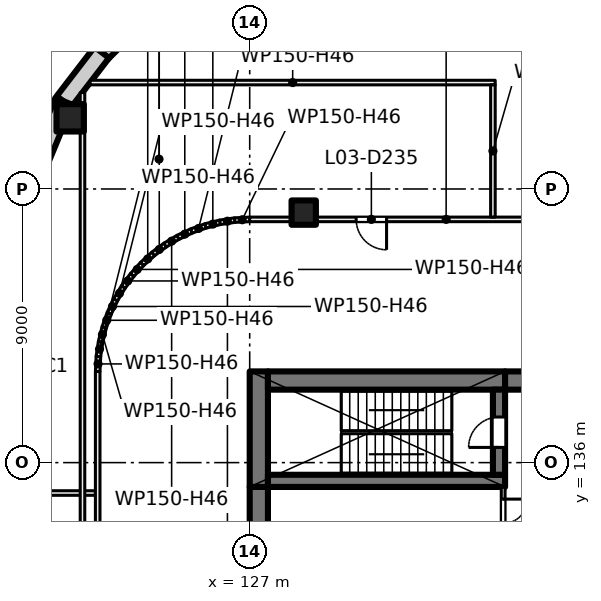
"""IFC4 building model, lengths in metres.
Left out: names, types, materials, properties, quantities, classifications, styles, units other than length and angle.
Written with IfcOpenShell. Run it as: python <this file> out.ifc"""

import sys

from ifc_helpers import new_model, si_unit, direction, frame, frame_2d, origin, origin_2d, place, context, subcontext, project, spatial, rectangle, extrude, element, fill, save


model = new_model("IFC4")
c1 = context("Model", 3, precision=1e-05, world=origin(), true_north=direction((0.0, 1.0)))
c2 = subcontext(c1, "Body", "Model", "MODEL_VIEW")
j1 = project(units=[si_unit("LENGTHUNIT", "METRE"), si_unit("PLANEANGLEUNIT", "RADIAN")], contexts=[c1])
p1 = place(None, origin())
s1 = spatial("IfcSite", under=j1, at=p1, CompositionType="ELEMENT")
p2 = place(p1, origin())
s2 = spatial("IfcBuilding", under=s1, at=p2, CompositionType="ELEMENT")
p3 = place(p2, frame((0.0, 0.0, 17.5)))
s3 = spatial("IfcBuildingStorey", under=s2, at=p3, CompositionType="ELEMENT", Elevation=17.5)
p4 = place(p3, frame((121.095, 147.341, 0.0), z_axis=(0.0, 0.0, 1.0), x_axis=(1.0, 0.0, 0.0)))
e1 = element("IfcColumn", 1, at=p4, inside=s3, PredefinedType="COLUMN", context=c2, shape_type="SweptSolid", body=[
    extrude(rectangle(XDim=0.9, YDim=0.9, at=origin_2d()), origin(), (0.0, 0.0, 1.0), 5.0),
])
p5 = place(p3, frame((128.777, 144.223, 0.0), z_axis=(0.0, 0.0, 1.0), x_axis=(1.0, 0.0, 0.0)))
e2 = element("IfcColumn", 2, at=p5, inside=s3, PredefinedType="COLUMN", context=c2, shape_type="SweptSolid", body=[
    extrude(rectangle(XDim=0.8, YDim=0.8, at=origin_2d()), origin(), (0.0, 0.0, 1.0), 5.0),
])
p6 = place(p3, frame((127.3, 120.8, 0.0), z_axis=(0.0, 0.0, 1.0), x_axis=(0.0, 1.0, 0.0)))
e3 = element("IfcWall", 3, at=p6, inside=s3, PredefinedType="SHEAR", context=c2, shape_type="SweptSolid", body=[
    extrude(rectangle(XDim=14.4, YDim=0.6, at=frame_2d((7.2, 0.0))), origin(), (0.0, 0.0, 1.0), 5.0),
])
p7 = place(p3, frame((127.3, 135.2, 0.0), z_axis=(0.0, 0.0, 1.0), x_axis=(0.0, 1.0, 0.0)))
e4 = element("IfcWall", 4, at=p7, inside=s3, PredefinedType="SHEAR", context=c2, shape_type="SweptSolid", body=[
    extrude(rectangle(XDim=3.8, YDim=0.6, at=frame_2d((1.9, 0.0))), origin(), (0.0, 0.0, 1.0), 5.0),
])
p8 = place(p3, frame((127.6, 138.7, 0.0), z_axis=(0.0, 0.0, 1.0), x_axis=(1.0, 0.0, 0.0)))
e5 = element("IfcWall", 5, at=p8, inside=s3, PredefinedType="SHEAR", context=c2, shape_type="SweptSolid", body=[
    extrude(rectangle(XDim=7.8, YDim=0.6, at=frame_2d((3.9, 0.0))), origin(), (0.0, 0.0, 1.0), 5.0),
])
p9 = place(p3, frame((135.4, 138.7, 0.0), z_axis=(0.0, 0.0, 1.0), x_axis=(1.0, 0.0, 0.0)))
e6 = element("IfcWall", 6, at=p9, inside=s3, PredefinedType="SHEAR", context=c2, shape_type="SweptSolid", body=[
    extrude(rectangle(XDim=4.6, YDim=0.6, at=frame_2d((2.3, 0.0))), origin(), (0.0, 0.0, 1.0), 5.0),
])
p10 = place(p3, frame((127.6, 135.4, 0.0), z_axis=(0.0, 0.0, 1.0), x_axis=(1.0, 0.0, 0.0)))
e7 = element("IfcWall", 7, at=p10, inside=s3, PredefinedType="SHEAR", context=c2, shape_type="SweptSolid", body=[
    extrude(rectangle(XDim=7.8, YDim=0.4, at=frame_2d((3.9, 0.0))), origin(), (0.0, 0.0, 1.0), 5.0),
])
p11 = place(p3, frame((135.2, 135.6, 0.0), z_axis=(0.0, 0.0, 1.0), x_axis=(0.0, 1.0, 0.0)))
e8 = element("IfcWall", 8, at=p11, inside=s3, PredefinedType="SHEAR", context=c2, shape_type="SweptSolid", body=[
    extrude(rectangle(XDim=2.8, YDim=0.4, at=frame_2d((1.4, 0.0))), origin(), (0.0, 0.0, 1.0), 5.0),
])
p12 = place(p11, frame((0.9, 0.0, 0.0)))
e9 = element("IfcOpeningElement", 9, at=p12, cuts=e8, PredefinedType="OPENING", context=c2, shape_type="SweptSolid", body=[
    extrude(rectangle(XDim=1.0, YDim=2.1, at=frame_2d((0.5, 1.05))), frame((0.0, 0.21, 0.0), z_axis=(0.0, -1.0, 0.0), x_axis=(1.0, 0.0, 0.0)), (0.0, 0.0, 1.0), 0.42),
])
p13 = place(p3, frame((122.11, 149.463, 0.0), z_axis=(0.0, 0.0, 1.0), x_axis=(0.707106781187, 0.707106781187, 0.0)))
e10 = element("IfcWall", 10, at=p13, inside=s3, PredefinedType="SOLIDWALL", context=c2, shape_type="SweptSolid", body=[
    extrude(rectangle(XDim=2.018, YDim=0.6, at=frame_2d((1.009, 0.0))), origin(), (0.0, 0.0, 1.0), 4.6),
])
p14 = place(p3, frame((120.891, 147.872, 0.0), z_axis=(0.0, 0.0, 1.0), x_axis=(0.609058260448, 0.793125485267, 0.0)))
e11 = element("IfcWall", 11, at=p14, inside=s3, PredefinedType="SOLIDWALL", context=c2, shape_type="SweptSolid", body=[
    extrude(rectangle(XDim=2.044, YDim=0.6, at=frame_2d((1.022, 0.0))), origin(), (0.0, 0.0, 1.0), 4.6),
])
p15 = place(p3, frame((120.079, 145.931, 0.0), z_axis=(0.0, 0.0, 1.0), x_axis=(0.382375593358, 0.924006983526, 0.0)))
e12 = element("IfcWall", 12, at=p15, inside=s3, PredefinedType="SOLIDWALL", context=c2, shape_type="SweptSolid", body=[
    extrude(rectangle(XDim=2.114, YDim=0.6, at=frame_2d((1.057, 0.0))), origin(), (0.0, 0.0, 1.0), 4.6),
])
p16 = place(p3, frame((135.337, 135.2, 0.0), z_axis=(0.0, 0.0, 1.0), x_axis=(0.0, -1.0, 0.0)))
e13 = element("IfcWall", 13, at=p16, inside=s3, PredefinedType="PARTITIONING", context=c2, shape_type="SweptSolid", body=[
    extrude(rectangle(XDim=1.6, YDim=0.125, at=frame_2d((0.8, 0.0))), origin(), (0.0, 0.0, 1.0), 4.6),
])
p17 = place(p16, frame((0.4, 0.0, 0.0)))
e14 = element("IfcOpeningElement", 14, at=p17, cuts=e13, PredefinedType="OPENING", context=c2, shape_type="SweptSolid", body=[
    extrude(rectangle(XDim=0.8, YDim=2.1, at=frame_2d((0.4, 1.05))), frame((0.0, 0.073, 0.0), z_axis=(0.0, -1.0, 0.0), x_axis=(1.0, 0.0, 0.0)), (0.0, 0.0, 1.0), 0.145),
])
p18 = place(p3, frame((113.075, 135.0, 0.0), z_axis=(0.0, 0.0, 1.0), x_axis=(1.0, 0.0, 0.0)))
e15 = element("IfcWall", 15, at=p18, inside=s3, PredefinedType="PARTITIONING", context=c2, shape_type="SweptSolid", body=[
    extrude(rectangle(XDim=8.85, YDim=0.15, at=frame_2d((4.425, 0.0))), origin(), (0.0, 0.0, 1.0), 4.6),
])
p19 = place(p3, frame((121.5, 107.925, 0.0), z_axis=(0.0, 0.0, 1.0), x_axis=(0.0, 1.0, 0.0)))
e16 = element("IfcWall", 16, at=p19, inside=s3, PredefinedType="PARTITIONING", context=c2, shape_type="SweptSolid", body=[
    extrude(rectangle(XDim=40.247, YDim=0.15, at=frame_2d((20.124, 0.0))), origin(), (0.0, 0.0, 1.0), 4.6),
])
p20 = place(p3, frame((121.752, 148.5, 0.0), z_axis=(0.0, 0.0, 1.0), x_axis=(1.0, 0.0, 0.0)))
e17 = element("IfcWall", 17, at=p20, inside=s3, PredefinedType="PARTITIONING", context=c2, shape_type="SweptSolid", body=[
    extrude(rectangle(XDim=13.323, YDim=0.15, at=frame_2d((6.662, 0.0))), origin(), (0.0, 0.0, 1.0), 4.6),
])
p21 = place(p3, frame((122.0, 139.002, 0.0), z_axis=(0.0, 0.0, 1.0), x_axis=(0.0, -1.0, 0.0)))
e18 = element("IfcWall", 18, at=p21, inside=s3, PredefinedType="PARTITIONING", context=c2, shape_type="SweptSolid", body=[
    extrude(rectangle(XDim=22.004, YDim=0.15, at=frame_2d((11.002, 0.0))), origin(), (0.0, 0.0, 1.0), 4.6),
])
p22 = place(p21, frame((10.252, 0.0, 0.0)))
e19 = element("IfcOpeningElement", 19, at=p22, cuts=e18, PredefinedType="OPENING", context=c2, shape_type="SweptSolid", body=[
    extrude(rectangle(XDim=1.0, YDim=2.1, at=frame_2d((0.5, 1.05))), frame((0.0, 0.085, 0.0), z_axis=(0.0, -1.0, 0.0), x_axis=(1.0, 0.0, 0.0)), (0.0, 0.0, 1.0), 0.17),
])
p23 = place(p3, frame((122.0, 138.998, 0.0), z_axis=(0.0, 0.0, 1.0), x_axis=(0.048196018647, 0.998837896651, 0.0)))
e20 = element("IfcWall", 20, at=p23, inside=s3, PredefinedType="PARTITIONING", context=c2, shape_type="SweptSolid", body=[
    extrude(rectangle(XDim=0.496, YDim=0.15, at=frame_2d((0.248, 0.0))), origin(), (0.0, 0.0, 1.0), 4.6),
])
p24 = place(p3, frame((122.023, 139.486, 0.0), z_axis=(0.0, 0.0, 1.0), x_axis=(0.148412307247, 0.988925572052, 0.0)))
e21 = element("IfcWall", 21, at=p24, inside=s3, PredefinedType="PARTITIONING", context=c2, shape_type="SweptSolid", body=[
    extrude(rectangle(XDim=0.499, YDim=0.15, at=frame_2d((0.249, 0.0))), origin(), (0.0, 0.0, 1.0), 4.6),
])
p25 = place(p3, frame((122.095, 139.971, 0.0), z_axis=(0.0, 0.0, 1.0), x_axis=(0.242650732785, 0.970113715952, 0.0)))
e22 = element("IfcWall", 22, at=p25, inside=s3, PredefinedType="PARTITIONING", context=c2, shape_type="SweptSolid", body=[
    extrude(rectangle(XDim=0.499, YDim=0.15, at=frame_2d((0.25, 0.0))), origin(), (0.0, 0.0, 1.0), 4.6),
])
for number, where, z_axis, x_axis in (
    (23, (122.214, 140.447, 0.0), (0.0, 0.0, 1.0), (0.337, 0.941, 0.0)),
    (24, (122.379, 140.91, 0.0), (0.0, 0.0, 1.0), (0.428, 0.904, 0.0)),
):
    element("IfcWall", number, at=place(p3, frame(where, z_axis=z_axis, x_axis=x_axis)), inside=s3, PredefinedType="PARTITIONING", context=c2, shape_type="SweptSolid", body=[
        extrude(rectangle(XDim=0.498, YDim=0.15, at=frame_2d((0.249, 0.0))), origin(), (0.0, 0.0, 1.0), 4.6),
    ])
p26 = place(p3, frame((122.588, 141.354, 0.0), z_axis=(0.0, 0.0, 1.0), x_axis=(0.515791778052, 0.85671397893, 0.0)))
e25 = element("IfcWall", 25, at=p26, inside=s3, PredefinedType="PARTITIONING", context=c2, shape_type="SweptSolid", body=[
    extrude(rectangle(XDim=0.499, YDim=0.15, at=frame_2d((0.249, 0.0))), origin(), (0.0, 0.0, 1.0), 4.6),
])
p27 = place(p3, frame((122.841, 141.775, 0.0), z_axis=(0.0, 0.0, 1.0), x_axis=(0.594570362092, 0.80404358372, 0.0)))
e26 = element("IfcWall", 26, at=p27, inside=s3, PredefinedType="PARTITIONING", context=c2, shape_type="SweptSolid", body=[
    extrude(rectangle(XDim=0.498, YDim=0.15, at=frame_2d((0.249, 0.0))), origin(), (0.0, 0.0, 1.0), 4.6),
])
for number, where, z_axis, x_axis in (
    (27, (123.133, 142.169, 0.0), (0.0, 0.0, 1.0), (0.67, 0.742, 0.0)),
    (28, (123.461, 142.533, 0.0), (0.0, 0.0, 1.0), (0.742, 0.67, 0.0)),
):
    element("IfcWall", number, at=place(p3, frame(where, z_axis=z_axis, x_axis=x_axis)), inside=s3, PredefinedType="PARTITIONING", context=c2, shape_type="SweptSolid", body=[
        extrude(rectangle(XDim=0.499, YDim=0.15, at=frame_2d((0.249, 0.0))), origin(), (0.0, 0.0, 1.0), 4.6),
    ])
p28 = place(p3, frame((123.825, 142.863, 0.0), z_axis=(0.0, 0.0, 1.0), x_axis=(0.80404358372, 0.594570362092, 0.0)))
e29 = element("IfcWall", 29, at=p28, inside=s3, PredefinedType="PARTITIONING", context=c2, shape_type="SweptSolid", body=[
    extrude(rectangle(XDim=0.498, YDim=0.15, at=frame_2d((0.249, 0.0))), origin(), (0.0, 0.0, 1.0), 4.6),
])
p29 = place(p3, frame((124.219, 143.155, 0.0), z_axis=(0.0, 0.0, 1.0), x_axis=(0.85671397893, 0.515791778052, 0.0)))
e30 = element("IfcWall", 30, at=p29, inside=s3, PredefinedType="PARTITIONING", context=c2, shape_type="SweptSolid", body=[
    extrude(rectangle(XDim=0.499, YDim=0.15, at=frame_2d((0.249, 0.0))), origin(), (0.0, 0.0, 1.0), 4.6),
])
for number, where, z_axis, x_axis in (
    (31, (124.64, 143.408, 0.0), (0.0, 0.0, 1.0), (0.904, 0.428, 0.0)),
    (32, (125.084, 143.618, 0.0), (0.0, 0.0, 1.0), (0.941, 0.337, 0.0)),
):
    element("IfcWall", number, at=place(p3, frame(where, z_axis=z_axis, x_axis=x_axis)), inside=s3, PredefinedType="PARTITIONING", context=c2, shape_type="SweptSolid", body=[
        extrude(rectangle(XDim=0.498, YDim=0.15, at=frame_2d((0.249, 0.0))), origin(), (0.0, 0.0, 1.0), 4.6),
    ])
p30 = place(p3, frame((125.545, 143.784, 0.0), z_axis=(0.0, 0.0, 1.0), x_axis=(0.970113715952, 0.242650732785, 0.0)))
e33 = element("IfcWall", 33, at=p30, inside=s3, PredefinedType="PARTITIONING", context=c2, shape_type="SweptSolid", body=[
    extrude(rectangle(XDim=0.499, YDim=0.15, at=frame_2d((0.25, 0.0))), origin(), (0.0, 0.0, 1.0), 4.6),
])
p31 = place(p3, frame((126.021, 143.903, 0.0), z_axis=(0.0, 0.0, 1.0), x_axis=(0.988925572052, 0.148412307247, 0.0)))
e34 = element("IfcWall", 34, at=p31, inside=s3, PredefinedType="PARTITIONING", context=c2, shape_type="SweptSolid", body=[
    extrude(rectangle(XDim=0.499, YDim=0.15, at=frame_2d((0.249, 0.0))), origin(), (0.0, 0.0, 1.0), 4.6),
])
p32 = place(p3, frame((126.506, 143.976, 0.0), z_axis=(0.0, 0.0, 1.0), x_axis=(0.998837896651, 0.048196018647, 0.0)))
e35 = element("IfcWall", 35, at=p32, inside=s3, PredefinedType="PARTITIONING", context=c2, shape_type="SweptSolid", body=[
    extrude(rectangle(XDim=0.496, YDim=0.15, at=frame_2d((0.248, 0.0))), origin(), (0.0, 0.0, 1.0), 4.6),
])
p33 = place(p3, frame((126.998, 144.0, 0.0), z_axis=(0.0, 0.0, 1.0), x_axis=(1.0, 0.0, 0.0)))
e36 = element("IfcWall", 36, at=p33, inside=s3, PredefinedType="PARTITIONING", context=c2, shape_type="SweptSolid", body=[
    extrude(rectangle(XDim=12.927, YDim=0.15, at=frame_2d((6.463, 0.0))), origin(), (0.0, 0.0, 1.0), 4.6),
])
p34 = place(p33, frame((3.504, 0.0, 0.0)))
e37 = element("IfcOpeningElement", 37, at=p34, cuts=e36, PredefinedType="OPENING", context=c2, shape_type="SweptSolid", body=[
    extrude(rectangle(XDim=1.0, YDim=2.1, at=frame_2d((0.5, 1.05))), frame((0.0, 0.085, 0.0), z_axis=(0.0, -1.0, 0.0), x_axis=(1.0, 0.0, 0.0)), (0.0, 0.0, 1.0), 0.17),
])
p35 = place(p3, frame((135.0, 144.075, 0.0), z_axis=(0.0, 0.0, 1.0), x_axis=(0.0, 1.0, 0.0)))
e38 = element("IfcWall", 38, at=p35, inside=s3, PredefinedType="PARTITIONING", context=c2, shape_type="SweptSolid", body=[
    extrude(rectangle(XDim=4.35, YDim=0.15, at=frame_2d((2.175, 0.0))), origin(), (0.0, 0.0, 1.0), 4.6),
])
p36 = place(p12, origin())
e39 = element("IfcDoor", 39, at=p36, inside=s3, OperationType="SINGLE_SWING_LEFT", PredefinedType="DOOR", context=c2, shape_type="SweptSolid", body=[
    extrude(rectangle(XDim=1.0, YDim=2.1, at=frame_2d((0.5, 1.05))), frame((0.0, 0.025, 0.0), z_axis=(0.0, -1.0, 0.0), x_axis=(1.0, 0.0, 0.0)), (0.0, 0.0, 1.0), 0.05),
])
fill(e9, e39)
p37 = place(p17, origin())
e40 = element("IfcDoor", 40, at=p37, inside=s3, OperationType="SINGLE_SWING_RIGHT", PredefinedType="DOOR", context=c2, shape_type="SweptSolid", body=[
    extrude(rectangle(XDim=0.8, YDim=2.1, at=frame_2d((0.4, 1.05))), frame((0.0, 0.025, 0.0), z_axis=(0.0, -1.0, 0.0), x_axis=(1.0, 0.0, 0.0)), (0.0, 0.0, 1.0), 0.05),
])
fill(e14, e40)
p38 = place(p34, origin())
e41 = element("IfcDoor", 41, at=p38, inside=s3, OperationType="SINGLE_SWING_RIGHT", PredefinedType="DOOR", context=c2, shape_type="SweptSolid", body=[
    extrude(rectangle(XDim=1.0, YDim=2.1, at=frame_2d((0.5, 1.05))), frame((0.0, 0.025, 0.0), z_axis=(0.0, -1.0, 0.0), x_axis=(1.0, 0.0, 0.0)), (0.0, 0.0, 1.0), 0.05),
])
fill(e37, e41)
save(model, sys.argv[1])
